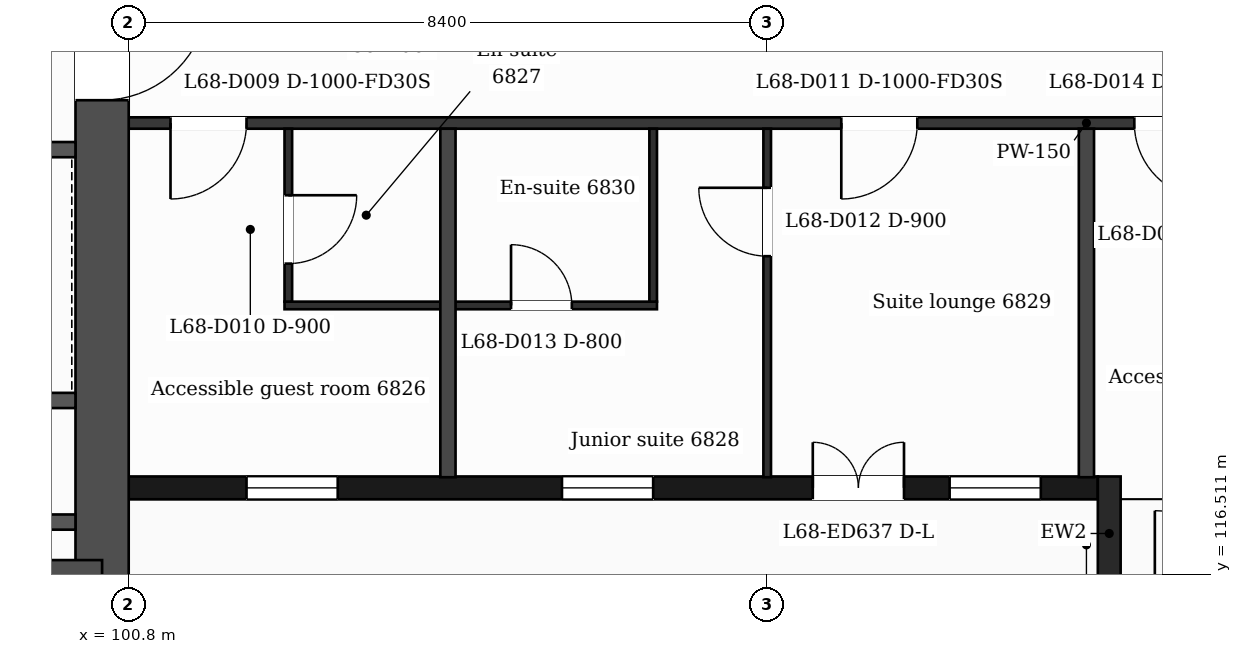
"""IFC4 building model, lengths in metres.
Left out: names, types, materials, properties, quantities, classifications, styles, units other than length and angle.
Written with IfcOpenShell. Run it as: python <this file> out.ifc"""

import sys

from ifc_helpers import new_model, si_unit, direction, frame, frame_2d, origin, place, context, subcontext, project, spatial, rectangle, extrude, element, fill, save


model = new_model("IFC4")
c1 = context("Model", 3, precision=1e-05, world=origin(), true_north=direction((0.0, 1.0)))
c2 = subcontext(c1, "Body", "Model", "MODEL_VIEW")
j1 = project(units=[si_unit("LENGTHUNIT", "METRE"), si_unit("PLANEANGLEUNIT", "RADIAN")], contexts=[c1])
p1 = place(None, origin())
s1 = spatial("IfcSite", under=j1, at=p1, CompositionType="ELEMENT")
p2 = place(p1, origin())
s2 = spatial("IfcBuilding", under=s1, at=p2, CompositionType="ELEMENT")
p3 = place(p2, frame((0.0, 0.0, 281.2)))
s3 = spatial("IfcBuildingStorey", under=s2, at=p3, CompositionType="ELEMENT", Elevation=281.2)
p4 = place(p3, frame((100.45, 132.05, 0.0), z_axis=(0.0, 0.0, 1.0), x_axis=(0.0, -1.0, 0.0)))
e1 = element("IfcWall", 1, at=p4, inside=s3, PredefinedType="SHEAR", context=c2, shape_type="SweptSolid", body=[
    extrude(rectangle(XDim=15.7, YDim=0.7, at=frame_2d((7.85, 0.0))), origin(), (0.0, 0.0, 1.0), 3.7),
])
p5 = place(p4, frame((7.9, 0.0, 0.0)))
e2 = element("IfcOpeningElement", 2, at=p5, cuts=e1, PredefinedType="OPENING", context=c2, shape_type="SweptSolid", body=[
    extrude(rectangle(XDim=1.4, YDim=2.1, at=frame_2d((0.7, 1.05))), frame((0.0, 0.36, 0.0), z_axis=(0.0, -1.0, 0.0), x_axis=(1.0, 0.0, 0.0)), (0.0, 0.0, 1.0), 0.72),
])
p6 = place(p3, frame((100.45, 116.35, 0.0), z_axis=(0.0, 0.0, 1.0), x_axis=(-1.0, 0.0, 0.0)))
e3 = element("IfcWall", 3, at=p6, inside=s3, PredefinedType="SHEAR", context=c2, shape_type="SweptSolid", body=[
    extrude(rectangle(XDim=13.627, YDim=0.7, at=frame_2d((6.813, 0.0))), origin(), (0.0, 0.0, 1.0), 3.7),
])
p7 = place(p3, frame((100.8, 117.65, 0.0), z_axis=(0.0, 0.0, 1.0), x_axis=(1.0, 0.0, 0.0)))
e4 = element("IfcWall", 4, at=p7, inside=s3, PredefinedType="SOLIDWALL", context=c2, shape_type="SweptSolid", body=[
    extrude(rectangle(XDim=12.75, YDim=0.3, at=frame_2d((6.375, 0.0))), origin(), (0.0, 0.0, 1.0), 3.38),
])
p8 = place(p7, frame((1.55, 0.0, 0.9)))
e5 = element("IfcOpeningElement", 5, at=p8, cuts=e4, PredefinedType="OPENING", context=c2, shape_type="SweptSolid", body=[
    extrude(rectangle(XDim=1.2, YDim=2.1, at=frame_2d((0.6, 1.05))), frame((0.0, 0.16, 0.0), z_axis=(0.0, -1.0, 0.0), x_axis=(1.0, 0.0, 0.0)), (0.0, 0.0, 1.0), 0.32),
])
p9 = place(p7, frame((5.7, 0.0, 0.9)))
e6 = element("IfcOpeningElement", 6, at=p9, cuts=e4, PredefinedType="OPENING", context=c2, shape_type="SweptSolid", body=[
    extrude(rectangle(XDim=1.2, YDim=2.1, at=frame_2d((0.6, 1.05))), frame((0.0, 0.16, 0.0), z_axis=(0.0, -1.0, 0.0), x_axis=(1.0, 0.0, 0.0)), (0.0, 0.0, 1.0), 0.32),
])
p10 = place(p7, frame((9.0, 0.0, 0.0)))
e7 = element("IfcOpeningElement", 7, at=p10, cuts=e4, PredefinedType="OPENING", context=c2, shape_type="SweptSolid", body=[
    extrude(rectangle(XDim=1.2, YDim=2.4, at=frame_2d((0.6, 1.2))), frame((0.0, 0.16, 0.0), z_axis=(0.0, -1.0, 0.0), x_axis=(1.0, 0.0, 0.0)), (0.0, 0.0, 1.0), 0.32),
])
p11 = place(p7, frame((10.8, 0.0, 0.9)))
e8 = element("IfcOpeningElement", 8, at=p11, cuts=e4, PredefinedType="OPENING", context=c2, shape_type="SweptSolid", body=[
    extrude(rectangle(XDim=1.2, YDim=2.1, at=frame_2d((0.6, 1.05))), frame((0.0, 0.16, 0.0), z_axis=(0.0, -1.0, 0.0), x_axis=(1.0, 0.0, 0.0)), (0.0, 0.0, 1.0), 0.32),
])
p12 = place(p3, frame((113.7, 117.8, 0.0), z_axis=(0.0, 0.0, 1.0), x_axis=(0.0, -1.0, 0.0)))
e9 = element("IfcWall", 9, at=p12, inside=s3, PredefinedType="SOLIDWALL", context=c2, shape_type="SweptSolid", body=[
    extrude(rectangle(XDim=1.5, YDim=0.3, at=frame_2d((0.75, 0.0))), origin(), (0.0, 0.0, 1.0), 3.38),
])
for number, where, z_axis, x_axis in (
    (10, (95.227, 117.2, 0.0), (0.0, 0.0, 1.0), (1.0, 0.0, 0.0)),
    (11, (95.227, 118.8, 0.0), (0.0, 0.0, 1.0), (1.0, 0.0, 0.0)),
):
    element("IfcWall", number, at=place(p3, frame(where, z_axis=z_axis, x_axis=x_axis)), inside=s3, PredefinedType="PARTITIONING", context=c2, shape_type="SweptSolid", body=[
        extrude(rectangle(XDim=4.873, YDim=0.2, at=frame_2d((2.437, 0.0))), origin(), (0.0, 0.0, 1.0), 3.38),
    ])
p13 = place(p3, frame((102.85, 120.05, 0.0), z_axis=(0.0, 0.0, 1.0), x_axis=(1.0, 0.0, 0.0)))
e12 = element("IfcWall", 12, at=p13, inside=s3, PredefinedType="PARTITIONING", context=c2, shape_type="SweptSolid", body=[
    extrude(rectangle(XDim=4.9, YDim=0.1, at=frame_2d((2.45, 0.0))), origin(), (0.0, 0.0, 1.0), 3.38),
])
p14 = place(p13, frame((2.98, 0.0, 0.0)))
e13 = element("IfcOpeningElement", 13, at=p14, cuts=e12, PredefinedType="OPENING", context=c2, shape_type="SweptSolid", body=[
    extrude(rectangle(XDim=0.8, YDim=2.1, at=frame_2d((0.4, 1.05))), frame((0.0, 0.06, 0.0), z_axis=(0.0, -1.0, 0.0), x_axis=(1.0, 0.0, 0.0)), (0.0, 0.0, 1.0), 0.12),
])
p15 = place(p3, frame((95.227, 122.1, 0.0), z_axis=(0.0, 0.0, 1.0), x_axis=(1.0, 0.0, 0.0)))
e14 = element("IfcWall", 14, at=p15, inside=s3, PredefinedType="PARTITIONING", context=c2, shape_type="SweptSolid", body=[
    extrude(rectangle(XDim=4.873, YDim=0.2, at=frame_2d((2.437, 0.0))), origin(), (0.0, 0.0, 1.0), 3.38),
])
p16 = place(p15, frame((0.605, 0.0, 0.0)))
e15 = element("IfcOpeningElement", 15, at=p16, cuts=e14, PredefinedType="OPENING", context=c2, shape_type="SweptSolid", body=[
    extrude(rectangle(XDim=1.1, YDim=2.1, at=frame_2d((0.55, 1.05))), frame((0.0, 0.11, 0.0), z_axis=(0.0, -1.0, 0.0), x_axis=(1.0, 0.0, 0.0)), (0.0, 0.0, 1.0), 0.22),
])
p17 = place(p15, frame((2.946, 0.0, 0.0)))
e16 = element("IfcOpeningElement", 16, at=p17, cuts=e14, PredefinedType="OPENING", context=c2, shape_type="SweptSolid", body=[
    extrude(rectangle(XDim=1.1, YDim=2.1, at=frame_2d((0.55, 1.05))), frame((0.0, 0.11, 0.0), z_axis=(0.0, -1.0, 0.0), x_axis=(1.0, 0.0, 0.0)), (0.0, 0.0, 1.0), 0.22),
])
p18 = place(p3, frame((100.8, 122.45, 0.0), z_axis=(0.0, 0.0, 1.0), x_axis=(1.0, 0.0, 0.0)))
e17 = element("IfcWall", 17, at=p18, inside=s3, PredefinedType="PARTITIONING", context=c2, shape_type="SweptSolid", body=[
    extrude(rectangle(XDim=25.2, YDim=0.15, at=frame_2d((12.6, 0.0))), origin(), (0.0, 0.0, 1.0), 3.38),
])
p19 = place(p18, frame((0.55, 0.0, 0.0)))
e18 = element("IfcOpeningElement", 18, at=p19, cuts=e17, PredefinedType="OPENING", context=c2, shape_type="SweptSolid", body=[
    extrude(rectangle(XDim=1.0, YDim=2.1, at=frame_2d((0.5, 1.05))), frame((0.0, 0.085, 0.0), z_axis=(0.0, -1.0, 0.0), x_axis=(1.0, 0.0, 0.0)), (0.0, 0.0, 1.0), 0.17),
])
p20 = place(p18, frame((9.375, 0.0, 0.0)))
e19 = element("IfcOpeningElement", 19, at=p20, cuts=e17, PredefinedType="OPENING", context=c2, shape_type="SweptSolid", body=[
    extrude(rectangle(XDim=1.0, YDim=2.1, at=frame_2d((0.5, 1.05))), frame((0.0, 0.085, 0.0), z_axis=(0.0, -1.0, 0.0), x_axis=(1.0, 0.0, 0.0)), (0.0, 0.0, 1.0), 0.17),
])
p21 = place(p18, frame((13.23, 0.0, 0.0)))
e20 = element("IfcOpeningElement", 20, at=p21, cuts=e17, PredefinedType="OPENING", context=c2, shape_type="SweptSolid", body=[
    extrude(rectangle(XDim=1.0, YDim=2.1, at=frame_2d((0.5, 1.05))), frame((0.0, 0.085, 0.0), z_axis=(0.0, -1.0, 0.0), x_axis=(1.0, 0.0, 0.0)), (0.0, 0.0, 1.0), 0.17),
])
p22 = place(p18, frame((19.513, 0.0, 0.0)))
e21 = element("IfcOpeningElement", 21, at=p22, cuts=e17, PredefinedType="OPENING", context=c2, shape_type="SweptSolid", body=[
    extrude(rectangle(XDim=0.95, YDim=2.1, at=frame_2d((0.475, 1.05))), frame((0.0, 0.085, 0.0), z_axis=(0.0, -1.0, 0.0), x_axis=(1.0, 0.0, 0.0)), (0.0, 0.0, 1.0), 0.17),
])
p23 = place(p18, frame((21.7, 0.0, 0.0)))
e22 = element("IfcOpeningElement", 22, at=p23, cuts=e17, PredefinedType="OPENING", context=c2, shape_type="SweptSolid", body=[
    extrude(rectangle(XDim=1.0, YDim=2.1, at=frame_2d((0.5, 1.05))), frame((0.0, 0.085, 0.0), z_axis=(0.0, -1.0, 0.0), x_axis=(1.0, 0.0, 0.0)), (0.0, 0.0, 1.0), 0.17),
])
p24 = place(p3, frame((102.9, 120.1, 0.0), z_axis=(0.0, 0.0, 1.0), x_axis=(0.0, 1.0, 0.0)))
e23 = element("IfcWall", 23, at=p24, inside=s3, PredefinedType="PARTITIONING", context=c2, shape_type="SweptSolid", body=[
    extrude(rectangle(XDim=2.275, YDim=0.1, at=frame_2d((1.137, 0.0))), origin(), (0.0, 0.0, 1.0), 3.38),
])
p25 = place(p24, frame((0.5, 0.0, 0.0)))
e24 = element("IfcOpeningElement", 24, at=p25, cuts=e23, PredefinedType="OPENING", context=c2, shape_type="SweptSolid", body=[
    extrude(rectangle(XDim=0.9, YDim=2.1, at=frame_2d((0.45, 1.05))), frame((0.0, 0.06, 0.0), z_axis=(0.0, -1.0, 0.0), x_axis=(1.0, 0.0, 0.0)), (0.0, 0.0, 1.0), 0.12),
])
p26 = place(p3, frame((105.0, 117.79, 0.0), z_axis=(0.0, 0.0, 1.0), x_axis=(0.0, 1.0, 0.0)))
e25 = element("IfcWall", 25, at=p26, inside=s3, PredefinedType="PARTITIONING", context=c2, shape_type="SweptSolid", body=[
    extrude(rectangle(XDim=4.585, YDim=0.2, at=frame_2d((2.292, 0.0))), origin(), (0.0, 0.0, 1.0), 3.38),
])
p27 = place(p3, frame((107.7, 120.1, 0.0), z_axis=(0.0, 0.0, 1.0), x_axis=(0.0, 1.0, 0.0)))
e26 = element("IfcWall", 26, at=p27, inside=s3, PredefinedType="PARTITIONING", context=c2, shape_type="SweptSolid", body=[
    extrude(rectangle(XDim=2.275, YDim=0.1, at=frame_2d((1.137, 0.0))), origin(), (0.0, 0.0, 1.0), 3.38),
])
p28 = place(p3, frame((109.2, 117.79, 0.0), z_axis=(0.0, 0.0, 1.0), x_axis=(0.0, 1.0, 0.0)))
e27 = element("IfcWall", 27, at=p28, inside=s3, PredefinedType="PARTITIONING", context=c2, shape_type="SweptSolid", body=[
    extrude(rectangle(XDim=4.585, YDim=0.1, at=frame_2d((2.292, 0.0))), origin(), (0.0, 0.0, 1.0), 3.38),
])
p29 = place(p28, frame((2.908, 0.0, 0.0)))
e28 = element("IfcOpeningElement", 28, at=p29, cuts=e27, PredefinedType="OPENING", context=c2, shape_type="SweptSolid", body=[
    extrude(rectangle(XDim=0.9, YDim=2.1, at=frame_2d((0.45, 1.05))), frame((0.0, 0.06, 0.0), z_axis=(0.0, -1.0, 0.0), x_axis=(1.0, 0.0, 0.0)), (0.0, 0.0, 1.0), 0.12),
])
p30 = place(p3, frame((113.4, 117.79, 0.0), z_axis=(0.0, 0.0, 1.0), x_axis=(0.0, 1.0, 0.0)))
e29 = element("IfcWall", 29, at=p30, inside=s3, PredefinedType="PARTITIONING", context=c2, shape_type="SweptSolid", body=[
    extrude(rectangle(XDim=4.585, YDim=0.2, at=frame_2d((2.292, 0.0))), origin(), (0.0, 0.0, 1.0), 3.38),
])
p31 = place(p8, origin())
e30 = element("IfcWindow", 30, at=p31, inside=s3, PartitioningType="SINGLE_PANEL", PredefinedType="WINDOW", context=c2, shape_type="SweptSolid", body=[
    extrude(rectangle(XDim=1.2, YDim=2.1, at=frame_2d((0.6, 1.05))), frame((0.0, 0.03, 0.0), z_axis=(0.0, -1.0, 0.0), x_axis=(1.0, 0.0, 0.0)), (0.0, 0.0, 1.0), 0.06),
])
fill(e5, e30)
p32 = place(p9, origin())
e31 = element("IfcWindow", 31, at=p32, inside=s3, PartitioningType="SINGLE_PANEL", PredefinedType="WINDOW", context=c2, shape_type="SweptSolid", body=[
    extrude(rectangle(XDim=1.2, YDim=2.1, at=frame_2d((0.6, 1.05))), frame((0.0, 0.03, 0.0), z_axis=(0.0, -1.0, 0.0), x_axis=(1.0, 0.0, 0.0)), (0.0, 0.0, 1.0), 0.06),
])
fill(e6, e31)
p33 = place(p10, origin())
e32 = element("IfcDoor", 32, at=p33, inside=s3, OperationType="DOUBLE_DOOR_SINGLE_SWING", PredefinedType="DOOR", context=c2, shape_type="SweptSolid", body=[
    extrude(rectangle(XDim=1.2, YDim=2.4, at=frame_2d((0.6, 1.2))), frame((0.0, 0.025, 0.0), z_axis=(0.0, -1.0, 0.0), x_axis=(1.0, 0.0, 0.0)), (0.0, 0.0, 1.0), 0.05),
])
fill(e7, e32)
p34 = place(p11, origin())
e33 = element("IfcWindow", 33, at=p34, inside=s3, PartitioningType="SINGLE_PANEL", PredefinedType="WINDOW", context=c2, shape_type="SweptSolid", body=[
    extrude(rectangle(XDim=1.2, YDim=2.1, at=frame_2d((0.6, 1.05))), frame((0.0, 0.03, 0.0), z_axis=(0.0, -1.0, 0.0), x_axis=(1.0, 0.0, 0.0)), (0.0, 0.0, 1.0), 0.06),
])
fill(e8, e33)
p35 = place(p19, origin())
e34 = element("IfcDoor", 34, at=p35, inside=s3, OperationType="SINGLE_SWING_LEFT", PredefinedType="DOOR", context=c2, shape_type="SweptSolid", body=[
    extrude(rectangle(XDim=1.0, YDim=2.1, at=frame_2d((0.5, 1.05))), frame((0.0, 0.025, 0.0), z_axis=(0.0, -1.0, 0.0), x_axis=(1.0, 0.0, 0.0)), (0.0, 0.0, 1.0), 0.05),
])
fill(e18, e34)
p36 = place(p25, origin())
e35 = element("IfcDoor", 35, at=p36, inside=s3, OperationType="SINGLE_SWING_RIGHT", PredefinedType="DOOR", context=c2, shape_type="SweptSolid", body=[
    extrude(rectangle(XDim=0.9, YDim=2.1, at=frame_2d((0.45, 1.05))), frame((0.0, 0.025, 0.0), z_axis=(0.0, -1.0, 0.0), x_axis=(1.0, 0.0, 0.0)), (0.0, 0.0, 1.0), 0.05),
])
fill(e24, e35)
p37 = place(p20, origin())
e36 = element("IfcDoor", 36, at=p37, inside=s3, OperationType="SINGLE_SWING_LEFT", PredefinedType="DOOR", context=c2, shape_type="SweptSolid", body=[
    extrude(rectangle(XDim=1.0, YDim=2.1, at=frame_2d((0.5, 1.05))), frame((0.0, 0.025, 0.0), z_axis=(0.0, -1.0, 0.0), x_axis=(1.0, 0.0, 0.0)), (0.0, 0.0, 1.0), 0.05),
])
fill(e19, e36)
p38 = place(p29, origin())
e37 = element("IfcDoor", 37, at=p38, inside=s3, OperationType="SINGLE_SWING_RIGHT", PredefinedType="DOOR", context=c2, shape_type="SweptSolid", body=[
    extrude(rectangle(XDim=0.9, YDim=2.1, at=frame_2d((0.45, 1.05))), frame((0.0, 0.025, 0.0), z_axis=(0.0, -1.0, 0.0), x_axis=(1.0, 0.0, 0.0)), (0.0, 0.0, 1.0), 0.05),
])
fill(e28, e37)
p39 = place(p14, origin())
e38 = element("IfcDoor", 38, at=p39, inside=s3, OperationType="SINGLE_SWING_LEFT", PredefinedType="DOOR", context=c2, shape_type="SweptSolid", body=[
    extrude(rectangle(XDim=0.8, YDim=2.1, at=frame_2d((0.4, 1.05))), frame((0.0, 0.025, 0.0), z_axis=(0.0, -1.0, 0.0), x_axis=(1.0, 0.0, 0.0)), (0.0, 0.0, 1.0), 0.05),
])
fill(e13, e38)
p40 = place(p21, origin())
e39 = element("IfcDoor", 39, at=p40, inside=s3, OperationType="SINGLE_SWING_RIGHT", PredefinedType="DOOR", context=c2, shape_type="SweptSolid", body=[
    extrude(rectangle(XDim=1.0, YDim=2.1, at=frame_2d((0.5, 1.05))), frame((0.0, 0.025, 0.0), z_axis=(0.0, -1.0, 0.0), x_axis=(1.0, 0.0, 0.0)), (0.0, 0.0, 1.0), 0.05),
])
fill(e20, e39)
p41 = place(p5, origin())
e40 = element("IfcDoor", 40, at=p41, inside=s3, OperationType="SINGLE_SWING_LEFT", PredefinedType="DOOR", context=c2, shape_type="SweptSolid", body=[
    extrude(rectangle(XDim=1.4, YDim=2.1, at=frame_2d((0.7, 1.05))), frame((0.0, 0.025, 0.0), z_axis=(0.0, -1.0, 0.0), x_axis=(1.0, 0.0, 0.0)), (0.0, 0.0, 1.0), 0.05),
])
fill(e2, e40)
save(model, sys.argv[1])
